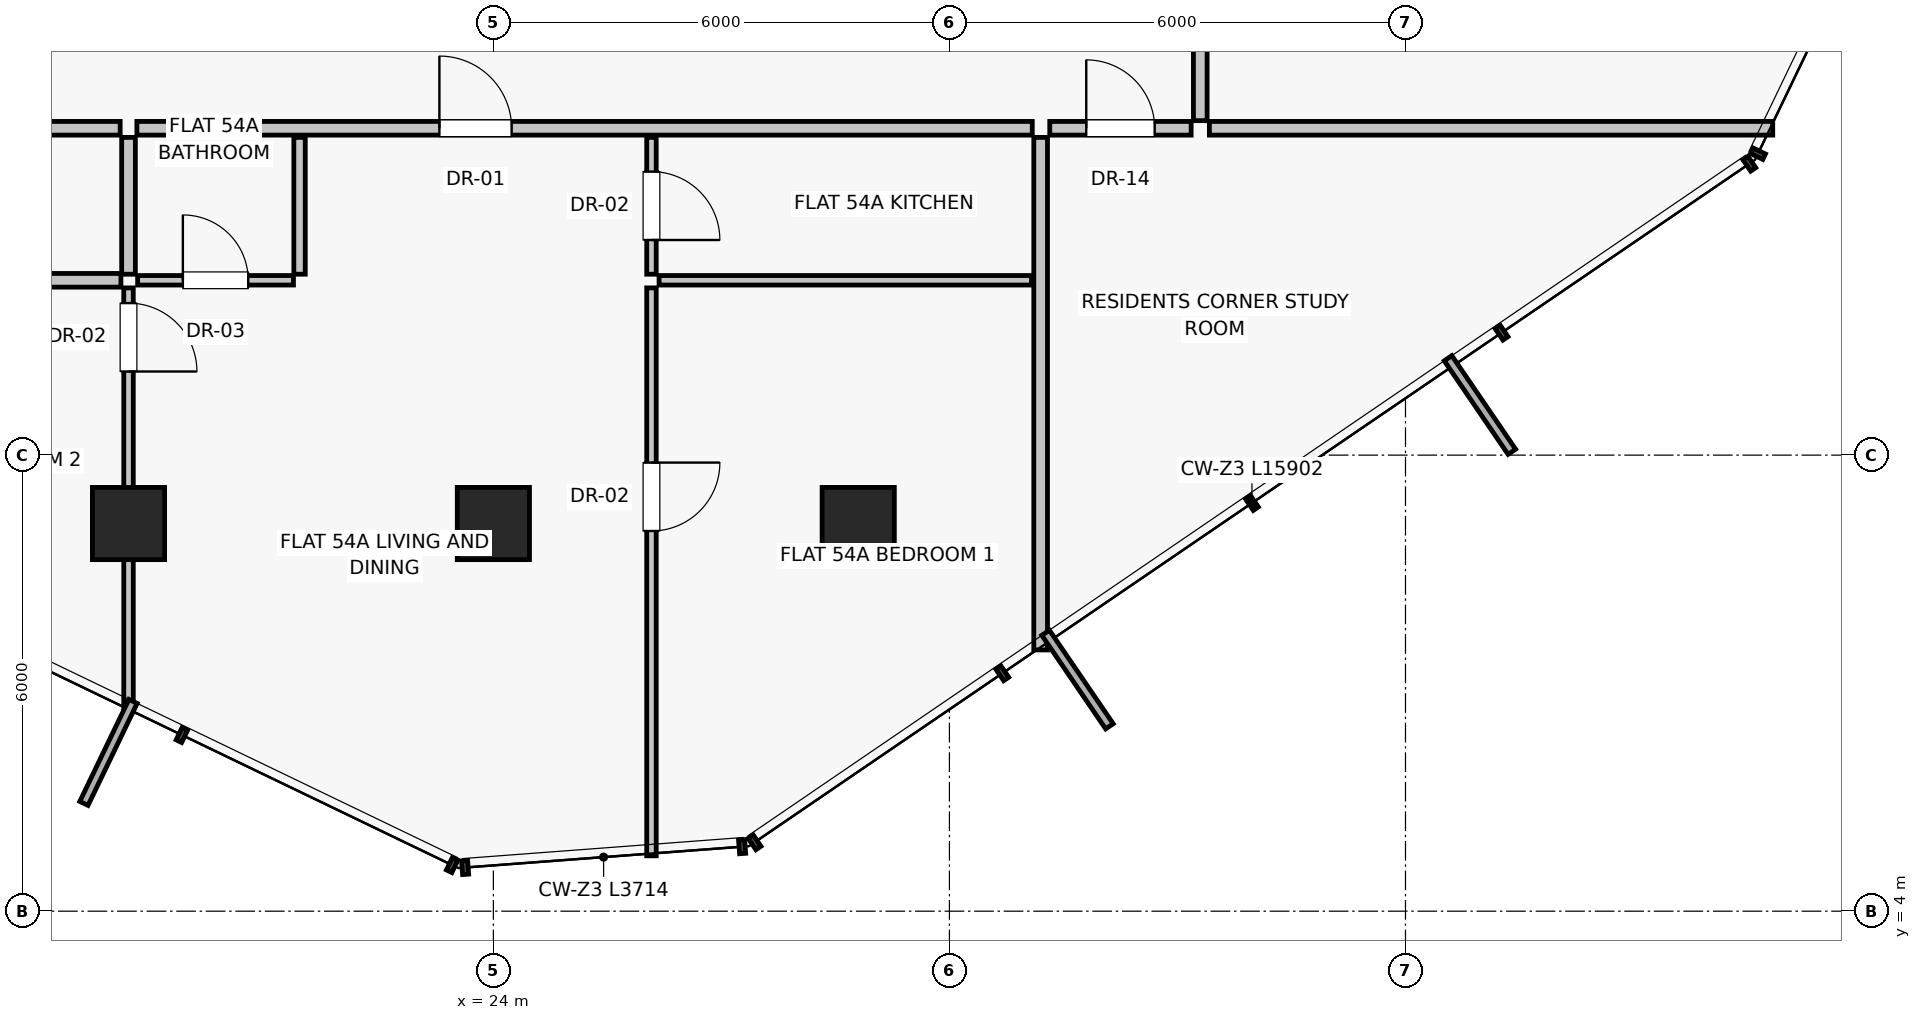
"""IFC4 building model, lengths in metres.
Left out: names, types, materials, properties, quantities, classifications, styles, units other than length and angle.
Written with IfcOpenShell. Run it as: python <this file> out.ifc"""

import sys

from ifc_helpers import new_model, si_unit, direction, frame, frame_2d, origin, origin_2d, place, context, subcontext, project, spatial, rectangle, extrude, source, transform, mapped, element, fill, save


model = new_model("IFC4")
c1 = context("Model", 3, precision=1e-05, world=origin(), true_north=direction((0.0, 1.0)))
c2 = subcontext(c1, "Body", "Model", "MODEL_VIEW")
j1 = project(units=[si_unit("LENGTHUNIT", "METRE"), si_unit("PLANEANGLEUNIT", "RADIAN")], contexts=[c1])
p1 = place(None, origin())
s1 = spatial("IfcSite", under=j1, at=p1, CompositionType="ELEMENT")
p2 = place(p1, origin())
s2 = spatial("IfcBuilding", under=s1, at=p2, CompositionType="ELEMENT")
p3 = place(p2, frame((0.0, 0.0, 191.85)))
s3 = spatial("IfcBuildingStorey", under=s2, at=p3, CompositionType="ELEMENT", Elevation=191.85)
for number, where, z_axis, x_axis in (
    (1, (19.2, 9.1, 0.0), (0.0, 0.0, 1.0), (1.0, 0.0, 0.0)),
    (2, (24.0, 9.1, 0.0), (0.0, 0.0, 1.0), (1.0, 0.0, 0.0)),
    (3, (28.8, 9.1, 0.0), (0.0, 0.0, 1.0), (1.0, 0.0, 0.0)),
):
    element("IfcColumn", number, at=place(p3, frame(where, z_axis=z_axis, x_axis=x_axis)), inside=s3, PredefinedType="COLUMN", context=c2, shape_type="SweptSolid", body=[
        extrude(rectangle(XDim=0.95, YDim=0.95, at=origin_2d()), origin(), (0.0, 0.0, 1.0), 3.25),
    ])
p4 = place(p3, frame((31.2, 14.18, 0.0), z_axis=(0.0, 0.0, 1.0), x_axis=(0.0, -1.0, 0.0)))
e4 = element("IfcWall", 4, at=p4, inside=s3, PredefinedType="PARTITIONING", context=c2, shape_type="SweptSolid", body=[
    extrude(rectangle(XDim=6.743, YDim=0.18, at=frame_2d((3.372, 0.0))), origin(), (0.0, 0.0, 1.0), 3.015),
])
p5 = place(p3, frame((15.31, 14.3, 0.0), z_axis=(0.0, 0.0, 1.0), x_axis=(1.0, 0.0, 0.0)))
e5 = element("IfcWall", 5, at=p5, inside=s3, PredefinedType="PARTITIONING", context=c2, shape_type="SweptSolid", body=[
    extrude(rectangle(XDim=3.78, YDim=0.18, at=frame_2d((1.89, 0.0))), origin(), (0.0, 0.0, 1.0), 3.015),
])
p6 = place(p5, frame((1.39, 0.0, 0.0)))
e6 = element("IfcOpeningElement", 6, at=p6, cuts=e5, PredefinedType="OPENING", context=c2, shape_type="SweptSolid", body=[
    extrude(rectangle(XDim=1.0, YDim=2.01, at=frame_2d((0.5, 1.005))), frame((0.0, 0.1, 0.0), z_axis=(0.0, -1.0, 0.0), x_axis=(1.0, 0.0, 0.0)), (0.0, 0.0, 1.0), 0.2),
])
p7 = place(p3, frame((19.31, 14.3, 0.0), z_axis=(0.0, 0.0, 1.0), x_axis=(1.0, 0.0, 0.0)))
e7 = element("IfcWall", 7, at=p7, inside=s3, PredefinedType="PARTITIONING", context=c2, shape_type="SweptSolid", body=[
    extrude(rectangle(XDim=11.78, YDim=0.18, at=frame_2d((5.89, 0.0))), origin(), (0.0, 0.0, 1.0), 3.015),
])
p8 = place(p7, frame((3.98, 0.0, 0.0)))
e8 = element("IfcOpeningElement", 8, at=p8, cuts=e7, PredefinedType="OPENING", context=c2, shape_type="SweptSolid", body=[
    extrude(rectangle(XDim=0.95, YDim=2.02, at=frame_2d((0.475, 1.01))), frame((0.0, 0.1, 0.0), z_axis=(0.0, -1.0, 0.0), x_axis=(1.0, 0.0, 0.0)), (0.0, 0.0, 1.0), 0.2),
])
p9 = place(p3, frame((15.32, 12.3, 0.0), z_axis=(0.0, 0.0, 1.0), x_axis=(1.0, 0.0, 0.0)))
e9 = element("IfcWall", 9, at=p9, inside=s3, PredefinedType="PARTITIONING", context=c2, shape_type="SweptSolid", body=[
    extrude(rectangle(XDim=3.78, YDim=0.18, at=frame_2d((1.89, 0.0))), origin(), (0.0, 0.0, 1.0), 3.015),
])
p10 = place(p3, frame((19.2, 14.18, 0.0), z_axis=(0.0, 0.0, 1.0), x_axis=(0.0, -1.0, 0.0)))
e10 = element("IfcWall", 10, at=p10, inside=s3, PredefinedType="PARTITIONING", context=c2, shape_type="SweptSolid", body=[
    extrude(rectangle(XDim=1.8, YDim=0.18, at=frame_2d((0.9, 0.0))), origin(), (0.0, 0.0, 1.0), 3.015),
])
p11 = place(p3, frame((19.2, 12.2, 0.0), z_axis=(0.0, 0.0, 1.0), x_axis=(0.0, -1.0, 0.0)))
e11 = element("IfcWall", 11, at=p11, inside=s3, PredefinedType="PARTITIONING", context=c2, shape_type="SweptSolid", body=[
    extrude(rectangle(XDim=5.578, YDim=0.125, at=frame_2d((2.789, 0.0))), origin(), (0.0, 0.0, 1.0), 2.469),
])
p12 = place(p11, frame((0.2, 0.0, 0.0)))
e12 = element("IfcOpeningElement", 12, at=p12, cuts=e11, PredefinedType="OPENING", context=c2, shape_type="SweptSolid", body=[
    extrude(rectangle(XDim=0.9, YDim=2.01, at=frame_2d((0.45, 1.005))), frame((0.0, 0.073, 0.0), z_axis=(0.0, -1.0, 0.0), x_axis=(1.0, 0.0, 0.0)), (0.0, 0.0, 1.0), 0.145),
])
p13 = place(p3, frame((21.45, 14.18, 0.0), z_axis=(0.0, 0.0, 1.0), x_axis=(0.0, -1.0, 0.0)))
e13 = element("IfcWall", 13, at=p13, inside=s3, PredefinedType="PARTITIONING", context=c2, shape_type="SweptSolid", body=[
    extrude(rectangle(XDim=1.8, YDim=0.15, at=frame_2d((0.9, 0.0))), origin(), (0.0, 0.0, 1.0), 3.015),
])
p14 = place(p3, frame((19.32, 12.3, 0.0), z_axis=(0.0, 0.0, 1.0), x_axis=(1.0, 0.0, 0.0)))
e14 = element("IfcWall", 14, at=p14, inside=s3, PredefinedType="PARTITIONING", context=c2, shape_type="SweptSolid", body=[
    extrude(rectangle(XDim=2.05, YDim=0.125, at=frame_2d((1.025, 0.0))), origin(), (0.0, 0.0, 1.0), 3.015),
])
p15 = place(p14, frame((0.595, 0.0, 0.0)))
e15 = element("IfcOpeningElement", 15, at=p15, cuts=e14, PredefinedType="OPENING", context=c2, shape_type="SweptSolid", body=[
    extrude(rectangle(XDim=0.86, YDim=2.01, at=frame_2d((0.43, 1.005))), frame((0.0, 0.073, 0.0), z_axis=(0.0, -1.0, 0.0), x_axis=(1.0, 0.0, 0.0)), (0.0, 0.0, 1.0), 0.145),
])
p16 = place(p3, frame((26.08, 14.18, 0.0), z_axis=(0.0, 0.0, 1.0), x_axis=(0.0, -1.0, 0.0)))
e16 = element("IfcWall", 16, at=p16, inside=s3, PredefinedType="PARTITIONING", context=c2, shape_type="SweptSolid", body=[
    extrude(rectangle(XDim=1.8, YDim=0.125, at=frame_2d((0.9, 0.0))), origin(), (0.0, 0.0, 1.0), 3.015),
])
p17 = place(p16, frame((0.45, 0.0, 0.0)))
e17 = element("IfcOpeningElement", 17, at=p17, cuts=e16, PredefinedType="OPENING", context=c2, shape_type="SweptSolid", body=[
    extrude(rectangle(XDim=0.9, YDim=2.01, at=frame_2d((0.45, 1.005))), frame((0.0, 0.073, 0.0), z_axis=(0.0, -1.0, 0.0), x_axis=(1.0, 0.0, 0.0)), (0.0, 0.0, 1.0), 0.145),
])
p18 = place(p3, frame((26.18, 12.3, 0.0), z_axis=(0.0, 0.0, 1.0), x_axis=(1.0, 0.0, 0.0)))
e18 = element("IfcWall", 18, at=p18, inside=s3, PredefinedType="PARTITIONING", context=c2, shape_type="SweptSolid", body=[
    extrude(rectangle(XDim=4.9, YDim=0.125, at=frame_2d((2.45, 0.0))), origin(), (0.0, 0.0, 1.0), 3.015),
])
p19 = place(p3, frame((26.08, 12.2, 0.0), z_axis=(0.0, 0.0, 1.0), x_axis=(0.0, -1.0, 0.0)))
e19 = element("IfcWall", 19, at=p19, inside=s3, PredefinedType="PARTITIONING", context=c2, shape_type="SweptSolid", body=[
    extrude(rectangle(XDim=7.471, YDim=0.125, at=frame_2d((3.736, 0.0))), origin(), (0.0, 0.0, 1.0), 3.015),
])
p20 = place(p19, frame((2.298, 0.0, 0.0)))
e20 = element("IfcOpeningElement", 20, at=p20, cuts=e19, PredefinedType="OPENING", context=c2, shape_type="SweptSolid", body=[
    extrude(rectangle(XDim=0.9, YDim=2.01, at=frame_2d((0.45, 1.005))), frame((0.0, 0.073, 0.0), z_axis=(0.0, -1.0, 0.0), x_axis=(1.0, 0.0, 0.0)), (0.0, 0.0, 1.0), 0.145),
])
p21 = place(p3, frame((33.3, 14.4, 0.0), z_axis=(0.0, 0.0, 1.0), x_axis=(0.0, 1.0, 0.0)))
e21 = element("IfcWall", 21, at=p21, inside=s3, PredefinedType="PARTITIONING", context=c2, shape_type="SweptSolid", body=[
    extrude(rectangle(XDim=1.9, YDim=0.18, at=frame_2d((0.95, 0.0))), origin(), (0.0, 0.0, 1.0), 3.015),
])
p22 = place(p3, frame((33.42, 14.3, 0.0), z_axis=(0.0, 0.0, 1.0), x_axis=(1.0, 0.0, 0.0)))
e22 = element("IfcWall", 22, at=p22, inside=s3, PredefinedType="PARTITIONING", context=c2, shape_type="SweptSolid", body=[
    extrude(rectangle(XDim=7.412, YDim=0.18, at=frame_2d((3.706, 0.0))), origin(), (0.0, 0.0, 1.0), 3.015),
])
p23 = place(p3, frame((31.32, 14.3, 0.0), z_axis=(0.0, 0.0, 1.0), x_axis=(1.0, 0.0, 0.0)))
e23 = element("IfcWall", 23, at=p23, inside=s3, PredefinedType="PARTITIONING", context=c2, shape_type="SweptSolid", body=[
    extrude(rectangle(XDim=1.86, YDim=0.18, at=frame_2d((0.93, 0.0))), origin(), (0.0, 0.0, 1.0), 3.015),
])
p24 = place(p23, frame((0.48, 0.0, 0.0)))
e24 = element("IfcOpeningElement", 24, at=p24, cuts=e23, PredefinedType="OPENING", context=c2, shape_type="SweptSolid", body=[
    extrude(rectangle(XDim=0.9, YDim=2.01, at=frame_2d((0.45, 1.005))), frame((0.0, 0.1, 0.0), z_axis=(0.0, -1.0, 0.0), x_axis=(1.0, 0.0, 0.0)), (0.0, 0.0, 1.0), 0.2),
])
m1 = source(origin(), c2, "Body", "SweptSolid", [
    extrude(rectangle(XDim=0.95, YDim=2.02, at=frame_2d((0.475, 1.01))), frame((0.0, 0.025, 0.0), z_axis=(0.0, -1.0, 0.0), x_axis=(1.0, 0.0, 0.0)), (0.0, 0.0, 1.0), 0.05),
])
p25 = place(p8, origin())
e25 = element("IfcDoor", 25, at=p25, inside=s3, OperationType="SINGLE_SWING_LEFT", PredefinedType="DOOR", context=c2, shape_type="MappedRepresentation", body=[
    mapped(m1, transform((0.0, 0.0, 0.0), scale=1.0)),
])
fill(e8, e25)
m2 = source(origin(), c2, "Body", "SweptSolid", [
    extrude(rectangle(XDim=0.9, YDim=2.01, at=frame_2d((0.45, 1.005))), frame((0.0, 0.025, 0.0), z_axis=(0.0, -1.0, 0.0), x_axis=(1.0, 0.0, 0.0)), (0.0, 0.0, 1.0), 0.05),
])
p26 = place(p12, origin())
e26 = element("IfcDoor", 26, at=p26, inside=s3, OperationType="SINGLE_SWING_RIGHT", PredefinedType="DOOR", context=c2, shape_type="MappedRepresentation", body=[
    mapped(m2, transform((0.0, 0.0, 0.0), scale=1.0)),
])
fill(e12, e26)
m3 = source(origin(), c2, "Body", "SweptSolid", [
    extrude(rectangle(XDim=0.86, YDim=2.01, at=frame_2d((0.43, 1.005))), frame((0.0, 0.025, 0.0), z_axis=(0.0, -1.0, 0.0), x_axis=(1.0, 0.0, 0.0)), (0.0, 0.0, 1.0), 0.05),
])
p27 = place(p15, origin())
e27 = element("IfcDoor", 27, at=p27, inside=s3, OperationType="SINGLE_SWING_LEFT", PredefinedType="DOOR", context=c2, shape_type="MappedRepresentation", body=[
    mapped(m3, transform((0.0, 0.0, 0.0), scale=1.0)),
])
fill(e15, e27)
p28 = place(p17, origin())
e28 = element("IfcDoor", 28, at=p28, inside=s3, OperationType="SINGLE_SWING_RIGHT", PredefinedType="DOOR", context=c2, shape_type="MappedRepresentation", body=[
    mapped(m2, transform((0.0, 0.0, 0.0), scale=1.0)),
])
fill(e17, e28)
p29 = place(p20, origin())
e29 = element("IfcDoor", 29, at=p29, inside=s3, OperationType="SINGLE_SWING_LEFT", PredefinedType="DOOR", context=c2, shape_type="MappedRepresentation", body=[
    mapped(m2, transform((0.0, 0.0, 0.0), scale=1.0)),
])
fill(e20, e29)
p30 = place(p24, origin())
e30 = element("IfcDoor", 30, at=p30, inside=s3, OperationType="SINGLE_SWING_LEFT", PredefinedType="DOOR", context=c2, shape_type="MappedRepresentation", body=[
    mapped(m2, transform((0.0, 0.0, 0.0), scale=1.0)),
])
fill(e24, e30)
save(model, sys.argv[1])
